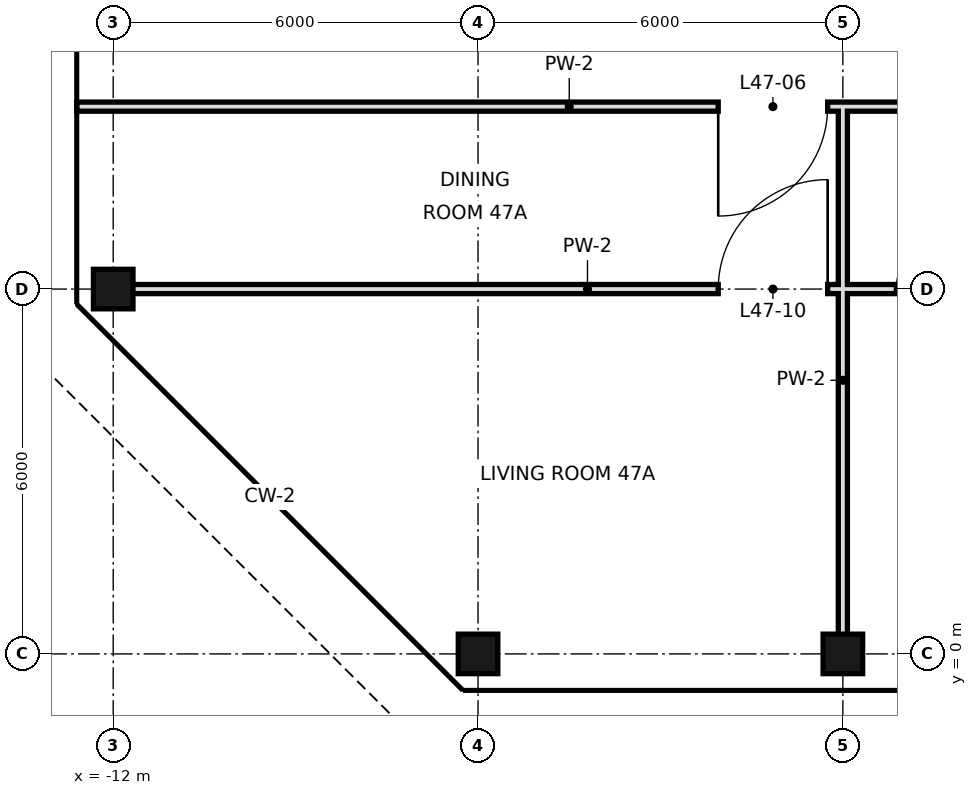
"""IFC4 building model, lengths in metres.
Left out: names, types, materials, properties, quantities, classifications, styles, units other than length and angle.
Written with IfcOpenShell. Run it as: python <this file> out.ifc"""

import sys

from ifc_helpers import new_model, si_unit, direction, frame, frame_2d, origin, origin_2d, place, context, subcontext, project, spatial, rectangle, hollow_rectangle, extrude, element, fill, save


model = new_model("IFC4")
c1 = context("Model", 3, precision=1e-05, world=origin(), true_north=direction((0.0, 1.0)))
c2 = subcontext(c1, "Body", "Model", "MODEL_VIEW")
j1 = project(units=[si_unit("LENGTHUNIT", "METRE"), si_unit("PLANEANGLEUNIT", "RADIAN")], contexts=[c1])
p1 = place(None, origin())
s1 = spatial("IfcSite", under=j1, at=p1, CompositionType="ELEMENT")
p2 = place(p1, origin())
s2 = spatial("IfcBuilding", under=s1, at=p2, CompositionType="ELEMENT")
p3 = place(p2, frame((0.0, 0.0, 202.8)))
s3 = spatial("IfcBuildingStorey", under=s2, at=p3, CompositionType="ELEMENT", Elevation=202.8)
for number, where, z_axis, x_axis in (
    (1, (-12.0, 6.0, 0.0), (0.0, 0.0, 1.0), (1.0, 0.0, 0.0)),
    (2, (-6.0, 0.0, 0.0), (0.0, 0.0, 1.0), (1.0, 0.0, 0.0)),
    (3, (0.0, 0.0, 0.0), (0.0, 0.0, 1.0), (1.0, 0.0, 0.0)),
):
    element("IfcColumn", number, at=place(p3, frame(where, z_axis=z_axis, x_axis=x_axis)), inside=s3, PredefinedType="COLUMN", context=c2, shape_type="SweptSolid", body=[
        extrude(hollow_rectangle(XDim=0.65, YDim=0.65, WallThickness=0.032, at=origin_2d()), origin(), (0.0, 0.0, 1.0), 3.6),
    ])
p4 = place(p3, frame((0.0, 0.0, 0.0), z_axis=(0.0, 0.0, 1.0), x_axis=(0.0, 1.0, 0.0)))
e4 = element("IfcWall", 4, at=p4, inside=s3, PredefinedType="PARTITIONING", context=c2, shape_type="SweptSolid", body=[
    extrude(rectangle(XDim=9.0, YDim=0.15, at=frame_2d((4.5, 0.0))), origin(), (0.0, 0.0, 1.0), 2.72),
])
p5 = place(p3, frame((-12.0, 6.0, 0.0), z_axis=(0.0, 0.0, 1.0), x_axis=(1.0, 0.0, 0.0)))
e5 = element("IfcWall", 5, at=p5, inside=s3, PredefinedType="PARTITIONING", context=c2, shape_type="SweptSolid", body=[
    extrude(rectangle(XDim=15.6, YDim=0.15, at=frame_2d((7.8, 0.0))), origin(), (0.0, 0.0, 1.0), 2.72),
])
p6 = place(p5, frame((9.95, 0.0, 0.0)))
e6 = element("IfcOpeningElement", 6, at=p6, cuts=e5, PredefinedType="OPENING", context=c2, shape_type="SweptSolid", body=[
    extrude(rectangle(XDim=1.8, YDim=2.4, at=frame_2d((0.9, 1.2))), frame((0.0, 0.085, 0.0), z_axis=(0.0, -1.0, 0.0), x_axis=(1.0, 0.0, 0.0)), (0.0, 0.0, 1.0), 0.17),
])
p7 = place(p5, frame((12.88, 0.0, 0.0)))
e7 = element("IfcOpeningElement", 7, at=p7, cuts=e5, PredefinedType="OPENING", context=c2, shape_type="SweptSolid", body=[
    extrude(rectangle(XDim=1.0, YDim=2.4, at=frame_2d((0.5, 1.2))), frame((0.0, 0.085, 0.0), z_axis=(0.0, -1.0, 0.0), x_axis=(1.0, 0.0, 0.0)), (0.0, 0.0, 1.0), 0.17),
])
p8 = place(p3, frame((-12.6, 9.0, 0.0), z_axis=(0.0, 0.0, 1.0), x_axis=(1.0, 0.0, 0.0)))
e8 = element("IfcWall", 8, at=p8, inside=s3, PredefinedType="PARTITIONING", context=c2, shape_type="SweptSolid", body=[
    extrude(rectangle(XDim=16.2, YDim=0.15, at=frame_2d((8.1, 0.0))), origin(), (0.0, 0.0, 1.0), 3.42),
])
p9 = place(p8, frame((10.55, 0.0, 0.0)))
e9 = element("IfcOpeningElement", 9, at=p9, cuts=e8, PredefinedType="OPENING", context=c2, shape_type="SweptSolid", body=[
    extrude(rectangle(XDim=1.8, YDim=2.4, at=frame_2d((0.9, 1.2))), frame((0.0, 0.085, 0.0), z_axis=(0.0, -1.0, 0.0), x_axis=(1.0, 0.0, 0.0)), (0.0, 0.0, 1.0), 0.17),
])
p10 = place(p8, frame((14.32, 0.0, 0.0)))
e10 = element("IfcOpeningElement", 10, at=p10, cuts=e8, PredefinedType="OPENING", context=c2, shape_type="SweptSolid", body=[
    extrude(rectangle(XDim=1.0, YDim=2.4, at=frame_2d((0.5, 1.2))), frame((0.0, 0.085, 0.0), z_axis=(0.0, -1.0, 0.0), x_axis=(1.0, 0.0, 0.0)), (0.0, 0.0, 1.0), 0.17),
])
p11 = place(p9, frame((1.8, 0.0, 0.0), z_axis=(0.0, 0.0, 1.0), x_axis=(-1.0, 0.0, 0.0)))
e11 = element("IfcDoor", 11, at=p11, inside=s3, OperationType="SINGLE_SWING_RIGHT", PredefinedType="DOOR", context=c2, shape_type="SweptSolid", body=[
    extrude(rectangle(XDim=1.8, YDim=2.4, at=frame_2d((0.9, 1.2))), frame((0.0, 0.025, 0.0), z_axis=(0.0, -1.0, 0.0), x_axis=(1.0, 0.0, 0.0)), (0.0, 0.0, 1.0), 0.05),
])
fill(e9, e11)
p12 = place(p6, frame((1.8, 0.0, 0.0), z_axis=(0.0, 0.0, 1.0), x_axis=(-1.0, 0.0, 0.0)))
e12 = element("IfcDoor", 12, at=p12, inside=s3, OperationType="SINGLE_SWING_LEFT", PredefinedType="DOOR", context=c2, shape_type="SweptSolid", body=[
    extrude(rectangle(XDim=1.8, YDim=2.4, at=frame_2d((0.9, 1.2))), frame((0.0, 0.025, 0.0), z_axis=(0.0, -1.0, 0.0), x_axis=(1.0, 0.0, 0.0)), (0.0, 0.0, 1.0), 0.05),
])
fill(e6, e12)
p13 = place(p7, frame((1.0, 0.0, 0.0), z_axis=(0.0, 0.0, 1.0), x_axis=(-1.0, 0.0, 0.0)))
e13 = element("IfcDoor", 13, at=p13, inside=s3, OperationType="SINGLE_SWING_LEFT", PredefinedType="DOOR", context=c2, shape_type="SweptSolid", body=[
    extrude(rectangle(XDim=1.0, YDim=2.4, at=frame_2d((0.5, 1.2))), frame((0.0, 0.025, 0.0), z_axis=(0.0, -1.0, 0.0), x_axis=(1.0, 0.0, 0.0)), (0.0, 0.0, 1.0), 0.05),
])
fill(e7, e13)
save(model, sys.argv[1])
